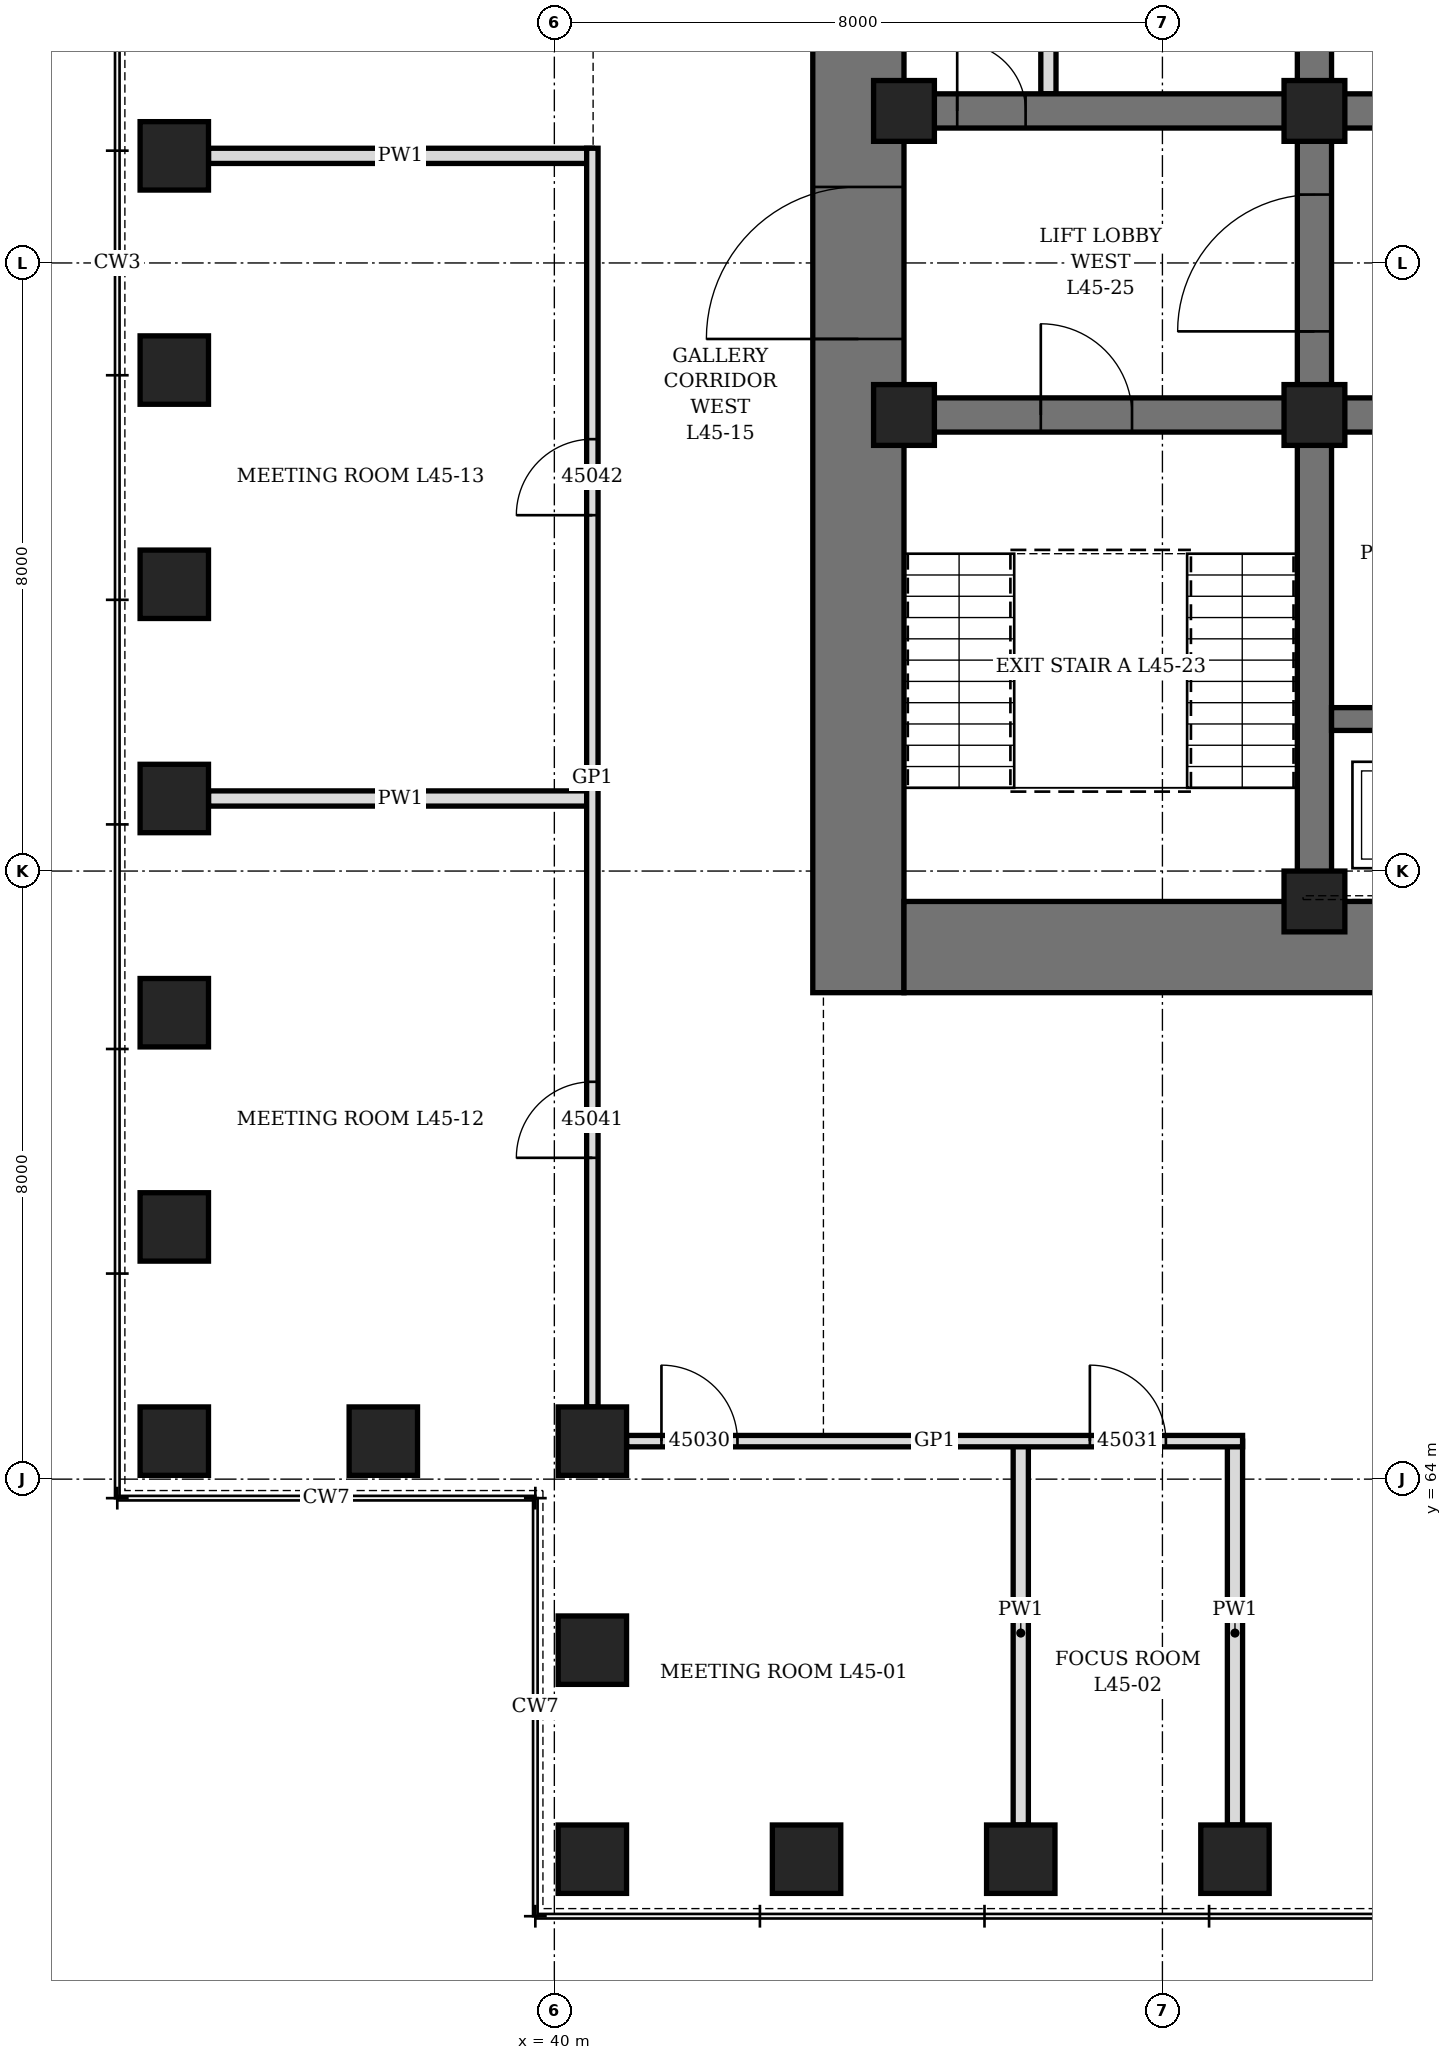
"""IFC4 building model, lengths in metres.
Left out: names, types, materials, properties, quantities, classifications, styles, units other than length and angle.
Written with IfcOpenShell. Run it as: python <this file> out.ifc"""

import sys

from ifc_helpers import new_model, si_unit, direction, frame, frame_2d, origin, origin_2d, place, context, subcontext, project, spatial, rectangle, hollow_rectangle, extrude, element, fill, save


model = new_model("IFC4")
c1 = context("Model", 3, precision=1e-05, world=origin(), true_north=direction((0.0, 1.0)))
c2 = subcontext(c1, "Body", "Model", "MODEL_VIEW")
j1 = project(units=[si_unit("LENGTHUNIT", "METRE"), si_unit("PLANEANGLEUNIT", "RADIAN")], contexts=[c1])
p1 = place(None, origin())
s1 = spatial("IfcSite", under=j1, at=p1, CompositionType="ELEMENT")
p2 = place(p1, origin())
s2 = spatial("IfcBuilding", under=s1, at=p2, CompositionType="ELEMENT")
p3 = place(p2, frame((0.0, 0.0, 202.3)))
s3 = spatial("IfcBuildingStorey", under=s2, at=p3, CompositionType="ELEMENT", Elevation=202.3)
for number, where, z_axis, x_axis in (
    (1, (40.5, 59.0, 0.0), (0.0, 0.0, 1.0), (1.0, 0.0, 0.0)),
    (2, (43.318, 59.0, 0.0), (0.0, 0.0, 1.0), (1.0, 0.0, 0.0)),
    (3, (46.136, 59.0, 0.0), (0.0, 0.0, 1.0), (1.0, 0.0, 0.0)),
    (4, (48.955, 59.0, 0.0), (0.0, 0.0, 1.0), (1.0, 0.0, 0.0)),
    (5, (35.0, 81.409, 0.0), (0.0, 0.0, 1.0), (0.0, 1.0, 0.0)),
    (6, (35.0, 78.591, 0.0), (0.0, 0.0, 1.0), (0.0, 1.0, 0.0)),
    (7, (35.0, 75.773, 0.0), (0.0, 0.0, 1.0), (0.0, 1.0, 0.0)),
    (8, (35.0, 72.955, 0.0), (0.0, 0.0, 1.0), (0.0, 1.0, 0.0)),
    (9, (35.0, 70.136, 0.0), (0.0, 0.0, 1.0), (0.0, 1.0, 0.0)),
    (10, (35.0, 67.318, 0.0), (0.0, 0.0, 1.0), (0.0, 1.0, 0.0)),
    (11, (35.0, 64.5, 0.0), (0.0, 0.0, 1.0), (1.0, 0.0, 0.0)),
    (12, (37.75, 64.5, 0.0), (0.0, 0.0, 1.0), (1.0, 0.0, 0.0)),
    (13, (40.5, 64.5, 0.0), (0.0, 0.0, 1.0), (0.0, 1.0, 0.0)),
    (14, (40.5, 61.75, 0.0), (0.0, 0.0, 1.0), (0.0, 1.0, 0.0)),
):
    element("IfcColumn", number, at=place(p3, frame(where, z_axis=z_axis, x_axis=x_axis)), inside=s3, PredefinedType="COLUMN", context=c2, shape_type="SweptSolid", body=[
        extrude(hollow_rectangle(XDim=0.9, YDim=0.9, WallThickness=0.12, at=origin_2d()), origin(), (0.0, 0.0, 1.0), 4.2),
    ])
p4 = place(p3, frame((44.0, 70.4, 0.0), z_axis=(0.0, 0.0, 1.0), x_axis=(0.0, 1.0, 0.0)))
e15 = element("IfcWall", 15, at=p4, inside=s3, PredefinedType="SHEAR", context=c2, shape_type="SweptSolid", body=[
    extrude(rectangle(XDim=19.2, YDim=1.2, at=frame_2d((9.6, 0.0))), origin(), (0.0, 0.0, 1.0), 4.2),
])
p5 = place(p4, frame((8.6, 0.0, 0.0)))
e16 = element("IfcOpeningElement", 16, at=p5, cuts=e15, PredefinedType="OPENING", context=c2, shape_type="SweptSolid", body=[
    extrude(rectangle(XDim=2.0, YDim=2.4, at=frame_2d((1.0, 1.2))), frame((0.0, 0.61, 0.0), z_axis=(0.0, -1.0, 0.0), x_axis=(1.0, 0.0, 0.0)), (0.0, 0.0, 1.0), 1.22),
])
p6 = place(p3, frame((44.6, 71.0, 0.0), z_axis=(0.0, 0.0, 1.0), x_axis=(1.0, 0.0, 0.0)))
e17 = element("IfcWall", 17, at=p6, inside=s3, PredefinedType="SHEAR", context=c2, shape_type="SweptSolid", body=[
    extrude(rectangle(XDim=22.8, YDim=1.2, at=frame_2d((11.4, 0.0))), origin(), (0.0, 0.0, 1.0), 4.2),
])
p7 = place(p6, frame((6.35, 0.0, 0.0)))
e18 = element("IfcOpeningElement", 18, at=p7, cuts=e17, PredefinedType="OPENING", context=c2, shape_type="SweptSolid", body=[
    extrude(rectangle(XDim=1.1, YDim=2.2, at=frame_2d((0.55, 1.1))), frame((0.0, 0.61, 0.0), z_axis=(0.0, -1.0, 0.0), x_axis=(1.0, 0.0, 0.0)), (0.0, 0.0, 1.0), 1.22),
])
p8 = place(p6, frame((9.35, 0.0, 0.0)))
e19 = element("IfcOpeningElement", 19, at=p8, cuts=e17, PredefinedType="OPENING", context=c2, shape_type="SweptSolid", body=[
    extrude(rectangle(XDim=1.1, YDim=2.2, at=frame_2d((0.55, 1.1))), frame((0.0, 0.61, 0.0), z_axis=(0.0, -1.0, 0.0), x_axis=(1.0, 0.0, 0.0)), (0.0, 0.0, 1.0), 1.22),
])
p9 = place(p6, frame((12.35, 0.0, 0.0)))
e20 = element("IfcOpeningElement", 20, at=p9, cuts=e17, PredefinedType="OPENING", context=c2, shape_type="SweptSolid", body=[
    extrude(rectangle(XDim=1.1, YDim=2.2, at=frame_2d((0.55, 1.1))), frame((0.0, 0.61, 0.0), z_axis=(0.0, -1.0, 0.0), x_axis=(1.0, 0.0, 0.0)), (0.0, 0.0, 1.0), 1.22),
])
p10 = place(p6, frame((15.35, 0.0, 0.0)))
e21 = element("IfcOpeningElement", 21, at=p10, cuts=e17, PredefinedType="OPENING", context=c2, shape_type="SweptSolid", body=[
    extrude(rectangle(XDim=1.1, YDim=2.2, at=frame_2d((0.55, 1.1))), frame((0.0, 0.61, 0.0), z_axis=(0.0, -1.0, 0.0), x_axis=(1.0, 0.0, 0.0)), (0.0, 0.0, 1.0), 1.22),
])
p11 = place(p3, frame((50.0, 71.6, 0.0), z_axis=(0.0, 0.0, 1.0), x_axis=(0.0, 1.0, 0.0)))
e22 = element("IfcWall", 22, at=p11, inside=s3, PredefinedType="SHEAR", context=c2, shape_type="SweptSolid", body=[
    extrude(rectangle(XDim=16.8, YDim=0.45, at=frame_2d((8.4, 0.0))), origin(), (0.0, 0.0, 1.0), 4.2),
])
p12 = place(p11, frame((7.5, 0.0, 0.0)))
e23 = element("IfcOpeningElement", 23, at=p12, cuts=e22, PredefinedType="OPENING", context=c2, shape_type="SweptSolid", body=[
    extrude(rectangle(XDim=1.8, YDim=2.4, at=frame_2d((0.9, 1.2))), frame((0.0, 0.235, 0.0), z_axis=(0.0, -1.0, 0.0), x_axis=(1.0, 0.0, 0.0)), (0.0, 0.0, 1.0), 0.47),
])
p13 = place(p3, frame((44.6, 78.0, 0.0), z_axis=(0.0, 0.0, 1.0), x_axis=(1.0, 0.0, 0.0)))
e24 = element("IfcWall", 24, at=p13, inside=s3, PredefinedType="SHEAR", context=c2, shape_type="SweptSolid", body=[
    extrude(rectangle(XDim=5.175, YDim=0.45, at=frame_2d((2.587, 0.0))), origin(), (0.0, 0.0, 1.0), 4.2),
])
p14 = place(p13, frame((1.8, 0.0, 0.0)))
e25 = element("IfcOpeningElement", 25, at=p14, cuts=e24, PredefinedType="OPENING", context=c2, shape_type="SweptSolid", body=[
    extrude(rectangle(XDim=1.2, YDim=2.1, at=frame_2d((0.6, 1.05))), frame((0.0, 0.235, 0.0), z_axis=(0.0, -1.0, 0.0), x_axis=(1.0, 0.0, 0.0)), (0.0, 0.0, 1.0), 0.47),
])
p15 = place(p3, frame((44.6, 82.0, 0.0), z_axis=(0.0, 0.0, 1.0), x_axis=(1.0, 0.0, 0.0)))
e26 = element("IfcWall", 26, at=p15, inside=s3, PredefinedType="SHEAR", context=c2, shape_type="SweptSolid", body=[
    extrude(rectangle(XDim=5.175, YDim=0.45, at=frame_2d((2.587, 0.0))), origin(), (0.0, 0.0, 1.0), 4.2),
])
p16 = place(p15, frame((0.7, 0.0, 0.0)))
e27 = element("IfcOpeningElement", 27, at=p16, cuts=e26, PredefinedType="OPENING", context=c2, shape_type="SweptSolid", body=[
    extrude(rectangle(XDim=0.9, YDim=2.1, at=frame_2d((0.45, 1.05))), frame((0.0, 0.235, 0.0), z_axis=(0.0, -1.0, 0.0), x_axis=(1.0, 0.0, 0.0)), (0.0, 0.0, 1.0), 0.47),
])
p17 = place(p3, frame((50.225, 78.0, 0.0), z_axis=(0.0, 0.0, 1.0), x_axis=(1.0, 0.0, 0.0)))
e28 = element("IfcWall", 28, at=p17, inside=s3, PredefinedType="SHEAR", context=c2, shape_type="SweptSolid", body=[
    extrude(rectangle(XDim=11.55, YDim=0.45, at=frame_2d((5.775, 0.0))), origin(), (0.0, 0.0, 1.0), 4.2),
])
p18 = place(p17, frame((0.825, 0.0, 0.0)))
e29 = element("IfcOpeningElement", 29, at=p18, cuts=e28, PredefinedType="OPENING", context=c2, shape_type="SweptSolid", body=[
    extrude(rectangle(XDim=0.9, YDim=2.1, at=frame_2d((0.45, 1.05))), frame((0.0, 0.235, 0.0), z_axis=(0.0, -1.0, 0.0), x_axis=(1.0, 0.0, 0.0)), (0.0, 0.0, 1.0), 0.47),
])
p19 = place(p17, frame((3.825, 0.0, 0.0)))
e30 = element("IfcOpeningElement", 30, at=p19, cuts=e28, PredefinedType="OPENING", context=c2, shape_type="SweptSolid", body=[
    extrude(rectangle(XDim=0.9, YDim=2.1, at=frame_2d((0.45, 1.05))), frame((0.0, 0.235, 0.0), z_axis=(0.0, -1.0, 0.0), x_axis=(1.0, 0.0, 0.0)), (0.0, 0.0, 1.0), 0.47),
])
p20 = place(p17, frame((6.825, 0.0, 0.0)))
e31 = element("IfcOpeningElement", 31, at=p20, cuts=e28, PredefinedType="OPENING", context=c2, shape_type="SweptSolid", body=[
    extrude(rectangle(XDim=0.9, YDim=2.1, at=frame_2d((0.45, 1.05))), frame((0.0, 0.235, 0.0), z_axis=(0.0, -1.0, 0.0), x_axis=(1.0, 0.0, 0.0)), (0.0, 0.0, 1.0), 0.47),
])
p21 = place(p17, frame((9.825, 0.0, 0.0)))
e32 = element("IfcOpeningElement", 32, at=p21, cuts=e28, PredefinedType="OPENING", context=c2, shape_type="SweptSolid", body=[
    extrude(rectangle(XDim=0.9, YDim=2.1, at=frame_2d((0.45, 1.05))), frame((0.0, 0.235, 0.0), z_axis=(0.0, -1.0, 0.0), x_axis=(1.0, 0.0, 0.0)), (0.0, 0.0, 1.0), 0.47),
])
p22 = place(p3, frame((50.225, 82.0, 0.0), z_axis=(0.0, 0.0, 1.0), x_axis=(1.0, 0.0, 0.0)))
e33 = element("IfcWall", 33, at=p22, inside=s3, PredefinedType="SHEAR", context=c2, shape_type="SweptSolid", body=[
    extrude(rectangle(XDim=11.55, YDim=0.45, at=frame_2d((5.775, 0.0))), origin(), (0.0, 0.0, 1.0), 4.2),
])
p23 = place(p22, frame((0.825, 0.0, 0.0)))
e34 = element("IfcOpeningElement", 34, at=p23, cuts=e33, PredefinedType="OPENING", context=c2, shape_type="SweptSolid", body=[
    extrude(rectangle(XDim=0.9, YDim=2.1, at=frame_2d((0.45, 1.05))), frame((0.0, 0.235, 0.0), z_axis=(0.0, -1.0, 0.0), x_axis=(1.0, 0.0, 0.0)), (0.0, 0.0, 1.0), 0.47),
])
p24 = place(p22, frame((3.825, 0.0, 0.0)))
e35 = element("IfcOpeningElement", 35, at=p24, cuts=e33, PredefinedType="OPENING", context=c2, shape_type="SweptSolid", body=[
    extrude(rectangle(XDim=0.9, YDim=2.1, at=frame_2d((0.45, 1.05))), frame((0.0, 0.235, 0.0), z_axis=(0.0, -1.0, 0.0), x_axis=(1.0, 0.0, 0.0)), (0.0, 0.0, 1.0), 0.47),
])
p25 = place(p22, frame((6.825, 0.0, 0.0)))
e36 = element("IfcOpeningElement", 36, at=p25, cuts=e33, PredefinedType="OPENING", context=c2, shape_type="SweptSolid", body=[
    extrude(rectangle(XDim=0.9, YDim=2.1, at=frame_2d((0.45, 1.05))), frame((0.0, 0.235, 0.0), z_axis=(0.0, -1.0, 0.0), x_axis=(1.0, 0.0, 0.0)), (0.0, 0.0, 1.0), 0.47),
])
p26 = place(p22, frame((9.825, 0.0, 0.0)))
e37 = element("IfcOpeningElement", 37, at=p26, cuts=e33, PredefinedType="OPENING", context=c2, shape_type="SweptSolid", body=[
    extrude(rectangle(XDim=0.9, YDim=2.1, at=frame_2d((0.45, 1.05))), frame((0.0, 0.235, 0.0), z_axis=(0.0, -1.0, 0.0), x_axis=(1.0, 0.0, 0.0)), (0.0, 0.0, 1.0), 0.47),
])
p27 = place(p3, frame((50.225, 74.0, 0.0), z_axis=(0.0, 0.0, 1.0), x_axis=(1.0, 0.0, 0.0)))
e38 = element("IfcWall", 38, at=p27, inside=s3, PredefinedType="SHEAR", context=c2, shape_type="SweptSolid", body=[
    extrude(rectangle(XDim=11.55, YDim=0.3, at=frame_2d((5.775, 0.0))), origin(), (0.0, 0.0, 1.0), 4.2),
])
for number, where, z_axis, x_axis in (
    (39, (44.6, 78.0, 0.0), (0.0, 0.0, 1.0), (1.0, 0.0, 0.0)),
    (40, (44.6, 82.0, 0.0), (0.0, 0.0, 1.0), (1.0, 0.0, 0.0)),
    (41, (50.0, 71.6, 0.0), (0.0, 0.0, 1.0), (1.0, 0.0, 0.0)),
    (42, (50.0, 78.0, 0.0), (0.0, 0.0, 1.0), (1.0, 0.0, 0.0)),
    (43, (50.0, 82.0, 0.0), (0.0, 0.0, 1.0), (1.0, 0.0, 0.0)),
):
    element("IfcColumn", number, at=place(p3, frame(where, z_axis=z_axis, x_axis=x_axis)), inside=s3, PredefinedType="COLUMN", context=c2, shape_type="SweptSolid", body=[
        extrude(hollow_rectangle(XDim=0.8, YDim=0.8, WallThickness=0.1, at=origin_2d()), origin(), (0.0, 0.0, 1.0), 4.2),
    ])
p28 = place(p3, frame((46.5, 82.225, 0.0), z_axis=(0.0, 0.0, 1.0), x_axis=(0.0, 1.0, 0.0)))
e44 = element("IfcWall", 44, at=p28, inside=s3, PredefinedType="PARTITIONING", context=c2, shape_type="SweptSolid", body=[
    extrude(rectangle(XDim=3.05, YDim=0.2, at=frame_2d((1.525, 0.0))), origin(), (0.0, 0.0, 1.0), 4.04),
])
p29 = place(p28, frame((1.075, 0.0, 0.0)))
e45 = element("IfcOpeningElement", 45, at=p29, cuts=e44, PredefinedType="OPENING", context=c2, shape_type="SweptSolid", body=[
    extrude(rectangle(XDim=0.9, YDim=2.1, at=frame_2d((0.45, 1.05))), frame((0.0, 0.11, 0.0), z_axis=(0.0, -1.0, 0.0), x_axis=(1.0, 0.0, 0.0)), (0.0, 0.0, 1.0), 0.22),
])
for number, where, z_axis, x_axis in (
    (46, (46.136, 59.45, 0.0), (0.0, 0.0, 1.0), (0.0, 1.0, 0.0)),
    (47, (48.955, 59.45, 0.0), (0.0, 0.0, 1.0), (0.0, 1.0, 0.0)),
    (48, (35.45, 72.955, 0.0), (0.0, 0.0, 1.0), (1.0, 0.0, 0.0)),
    (49, (35.45, 81.409, 0.0), (0.0, 0.0, 1.0), (1.0, 0.0, 0.0)),
):
    element("IfcWall", number, at=place(p3, frame(where, z_axis=z_axis, x_axis=x_axis)), inside=s3, PredefinedType="PARTITIONING", context=c2, shape_type="SweptSolid", body=[
        extrude(rectangle(XDim=5.05, YDim=0.2, at=frame_2d((2.525, 0.0))), origin(), (0.0, 0.0, 1.0), 3.428),
    ])
p30 = place(p3, frame((40.95, 64.5, 0.0), z_axis=(0.0, 0.0, 1.0), x_axis=(1.0, 0.0, 0.0)))
e50 = element("IfcWall", 50, at=p30, inside=s3, PredefinedType="PARTITIONING", context=c2, shape_type="SweptSolid", body=[
    extrude(rectangle(XDim=8.104, YDim=0.15, at=frame_2d((4.052, 0.0))), origin(), (0.0, 0.0, 1.0), 4.04),
])
p31 = place(p30, frame((0.459, 0.0, 0.0)))
e51 = element("IfcOpeningElement", 51, at=p31, cuts=e50, PredefinedType="OPENING", context=c2, shape_type="SweptSolid", body=[
    extrude(rectangle(XDim=1.0, YDim=2.4, at=frame_2d((0.5, 1.2))), frame((0.0, 0.085, 0.0), z_axis=(0.0, -1.0, 0.0), x_axis=(1.0, 0.0, 0.0)), (0.0, 0.0, 1.0), 0.17),
])
p32 = place(p30, frame((6.095, 0.0, 0.0)))
e52 = element("IfcOpeningElement", 52, at=p32, cuts=e50, PredefinedType="OPENING", context=c2, shape_type="SweptSolid", body=[
    extrude(rectangle(XDim=1.0, YDim=2.4, at=frame_2d((0.5, 1.2))), frame((0.0, 0.085, 0.0), z_axis=(0.0, -1.0, 0.0), x_axis=(1.0, 0.0, 0.0)), (0.0, 0.0, 1.0), 0.17),
])
p33 = place(p3, frame((40.5, 64.95, 0.0), z_axis=(0.0, 0.0, 1.0), x_axis=(0.0, 1.0, 0.0)))
e53 = element("IfcWall", 53, at=p33, inside=s3, PredefinedType="PARTITIONING", context=c2, shape_type="SweptSolid", body=[
    extrude(rectangle(XDim=16.559, YDim=0.15, at=frame_2d((8.28, 0.0))), origin(), (0.0, 0.0, 1.0), 4.04),
])
p34 = place(p33, frame((3.277, 0.0, 0.0)))
e54 = element("IfcOpeningElement", 54, at=p34, cuts=e53, PredefinedType="OPENING", context=c2, shape_type="SweptSolid", body=[
    extrude(rectangle(XDim=1.0, YDim=2.4, at=frame_2d((0.5, 1.2))), frame((0.0, 0.085, 0.0), z_axis=(0.0, -1.0, 0.0), x_axis=(1.0, 0.0, 0.0)), (0.0, 0.0, 1.0), 0.17),
])
p35 = place(p33, frame((11.732, 0.0, 0.0)))
e55 = element("IfcOpeningElement", 55, at=p35, cuts=e53, PredefinedType="OPENING", context=c2, shape_type="SweptSolid", body=[
    extrude(rectangle(XDim=1.0, YDim=2.4, at=frame_2d((0.5, 1.2))), frame((0.0, 0.085, 0.0), z_axis=(0.0, -1.0, 0.0), x_axis=(1.0, 0.0, 0.0)), (0.0, 0.0, 1.0), 0.17),
])
p36 = place(p16, origin())
e56 = element("IfcDoor", 56, at=p36, inside=s3, OperationType="SINGLE_SWING_LEFT", PredefinedType="DOOR", context=c2, shape_type="SweptSolid", body=[
    extrude(rectangle(XDim=0.9, YDim=2.1, at=frame_2d((0.45, 1.05))), frame((0.0, 0.225, 0.0), z_axis=(0.0, -1.0, 0.0), x_axis=(1.0, 0.0, 0.0)), (0.0, 0.0, 1.0), 0.449),
])
fill(e27, e56)
p37 = place(p14, origin())
e57 = element("IfcDoor", 57, at=p37, inside=s3, OperationType="SINGLE_SWING_LEFT", PredefinedType="DOOR", context=c2, shape_type="SweptSolid", body=[
    extrude(rectangle(XDim=1.2, YDim=2.1, at=frame_2d((0.6, 1.05))), frame((0.0, 0.225, 0.0), z_axis=(0.0, -1.0, 0.0), x_axis=(1.0, 0.0, 0.0)), (0.0, 0.0, 1.0), 0.449),
])
fill(e25, e57)
p38 = place(p5, origin())
e58 = element("IfcDoor", 58, at=p38, inside=s3, OperationType="DOUBLE_DOOR_SINGLE_SWING", PredefinedType="DOOR", context=c2, shape_type="SweptSolid", body=[
    extrude(rectangle(XDim=2.0, YDim=2.4, at=frame_2d((1.0, 1.2))), frame((0.0, 0.35, 0.0), z_axis=(0.0, -1.0, 0.0), x_axis=(1.0, 0.0, 0.0)), (0.0, 0.0, 1.0), 0.7),
])
fill(e16, e58)
p39 = place(p12, origin())
e59 = element("IfcDoor", 59, at=p39, inside=s3, OperationType="DOUBLE_DOOR_SINGLE_SWING", PredefinedType="DOOR", context=c2, shape_type="SweptSolid", body=[
    extrude(rectangle(XDim=1.8, YDim=2.4, at=frame_2d((0.9, 1.2))), frame((0.0, 0.225, 0.0), z_axis=(0.0, -1.0, 0.0), x_axis=(1.0, 0.0, 0.0)), (0.0, 0.0, 1.0), 0.449),
])
fill(e23, e59)
p40 = place(p31, origin())
e60 = element("IfcDoor", 60, at=p40, inside=s3, OperationType="SINGLE_SWING_RIGHT", PredefinedType="DOOR", context=c2, shape_type="SweptSolid", body=[
    extrude(rectangle(XDim=1.0, YDim=2.4, at=frame_2d((0.5, 1.2))), frame((0.0, 0.075, 0.0), z_axis=(0.0, -1.0, 0.0), x_axis=(1.0, 0.0, 0.0)), (0.0, 0.0, 1.0), 0.149),
])
fill(e51, e60)
p41 = place(p32, origin())
e61 = element("IfcDoor", 61, at=p41, inside=s3, OperationType="SINGLE_SWING_RIGHT", PredefinedType="DOOR", context=c2, shape_type="SweptSolid", body=[
    extrude(rectangle(XDim=1.0, YDim=2.4, at=frame_2d((0.5, 1.2))), frame((0.0, 0.075, 0.0), z_axis=(0.0, -1.0, 0.0), x_axis=(1.0, 0.0, 0.0)), (0.0, 0.0, 1.0), 0.149),
])
fill(e52, e61)
p42 = place(p34, origin())
e62 = element("IfcDoor", 62, at=p42, inside=s3, OperationType="SINGLE_SWING_RIGHT", PredefinedType="DOOR", context=c2, shape_type="SweptSolid", body=[
    extrude(rectangle(XDim=1.0, YDim=2.4, at=frame_2d((0.5, 1.2))), frame((0.0, 0.075, 0.0), z_axis=(0.0, -1.0, 0.0), x_axis=(1.0, 0.0, 0.0)), (0.0, 0.0, 1.0), 0.149),
])
fill(e54, e62)
p43 = place(p35, origin())
e63 = element("IfcDoor", 63, at=p43, inside=s3, OperationType="SINGLE_SWING_RIGHT", PredefinedType="DOOR", context=c2, shape_type="SweptSolid", body=[
    extrude(rectangle(XDim=1.0, YDim=2.4, at=frame_2d((0.5, 1.2))), frame((0.0, 0.075, 0.0), z_axis=(0.0, -1.0, 0.0), x_axis=(1.0, 0.0, 0.0)), (0.0, 0.0, 1.0), 0.149),
])
fill(e55, e63)
save(model, sys.argv[1])
